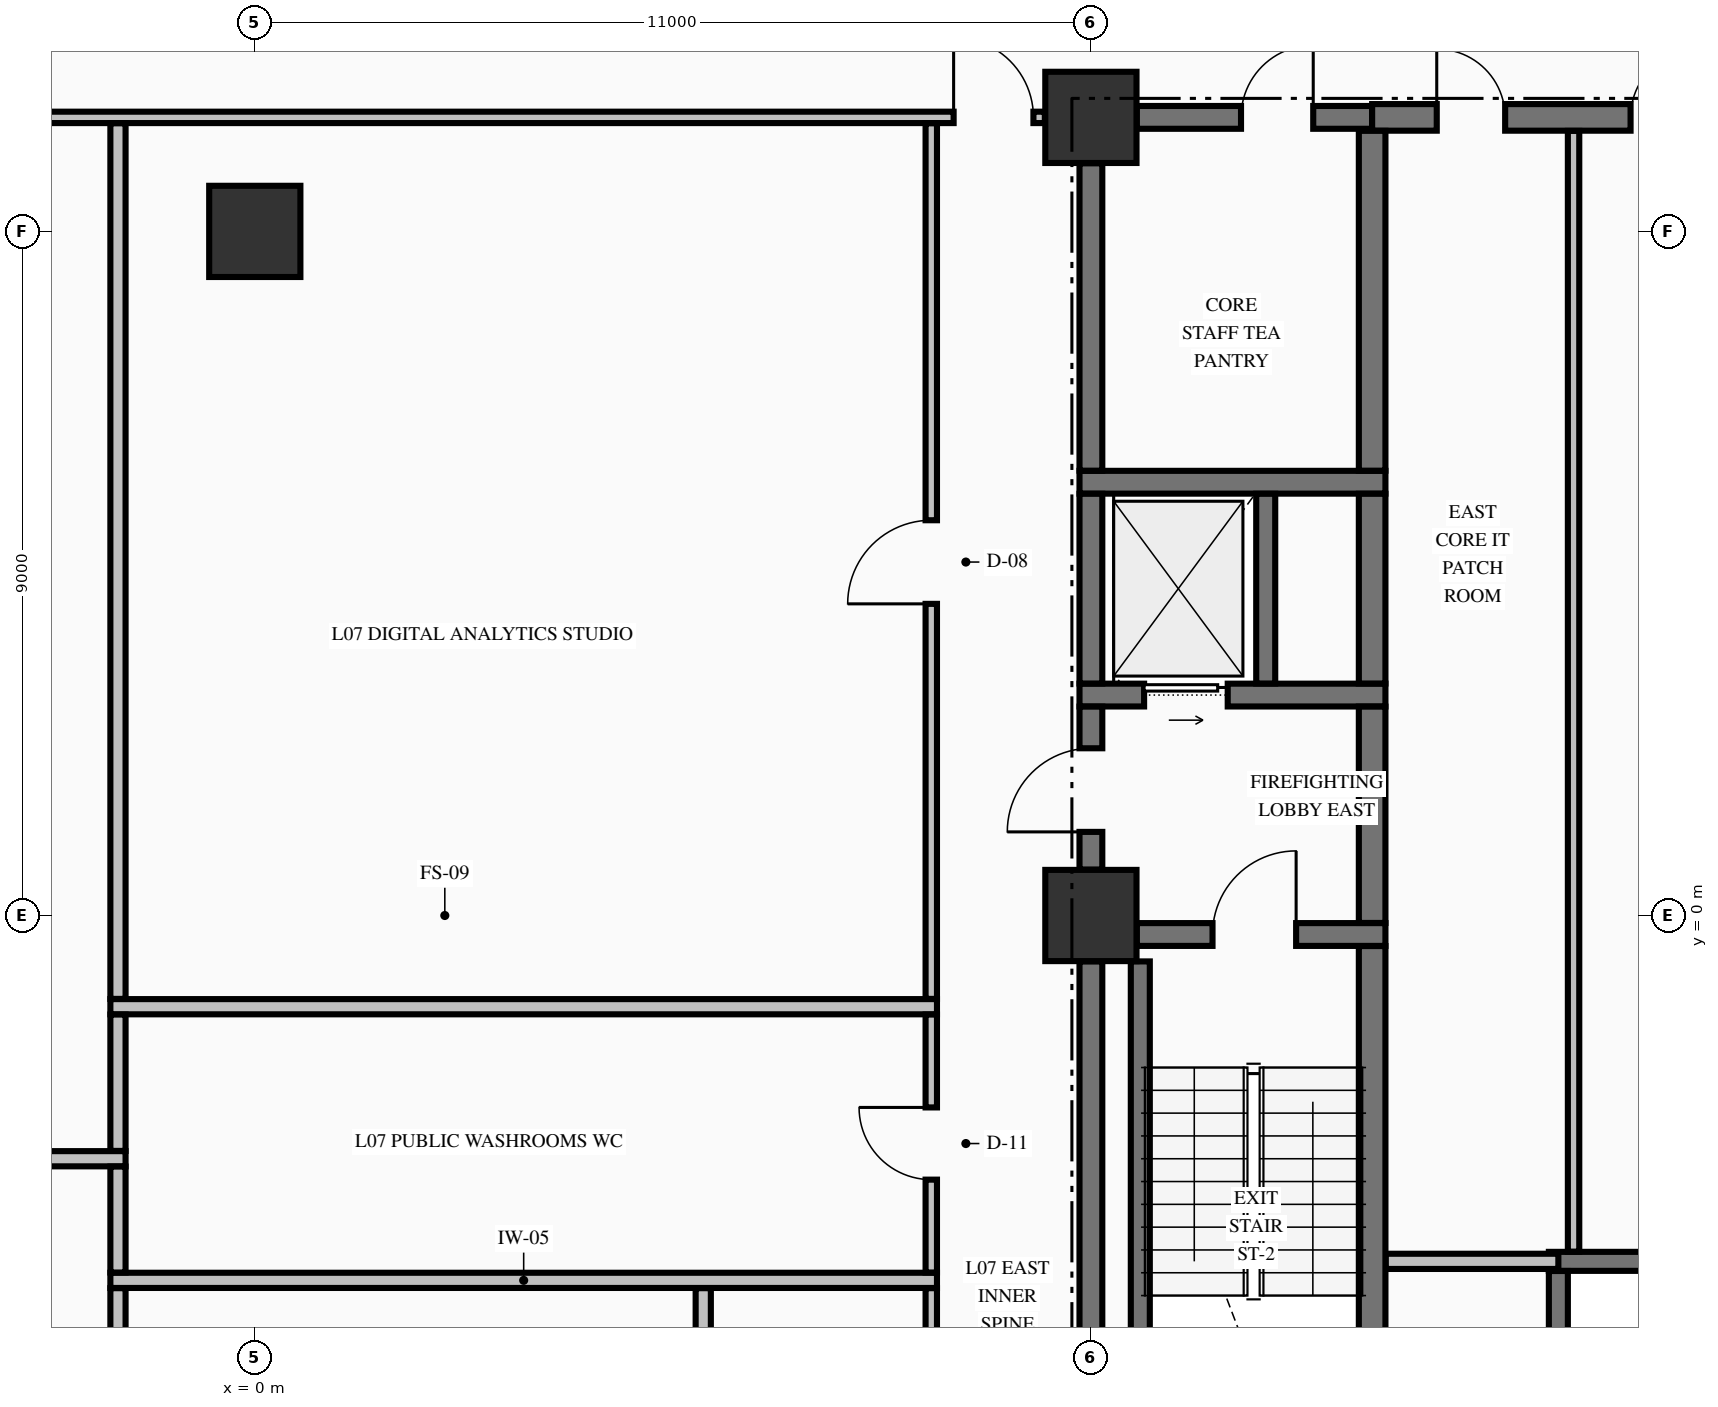
"""IFC4 building model, lengths in metres.
Left out: names, types, materials, properties, quantities, classifications, styles, units other than length and angle.
Written with IfcOpenShell. Run it as: python <this file> out.ifc"""

import sys

from ifc_helpers import new_model, si_unit, direction, frame, frame_2d, origin, origin_2d, place, context, subcontext, project, spatial, rectangle, extrude, element, fill, save


model = new_model("IFC4")
c1 = context("Model", 3, precision=1e-05, world=origin(), true_north=direction((0.0, 1.0)))
c2 = subcontext(c1, "Body", "Model", "MODEL_VIEW")
j1 = project(units=[si_unit("LENGTHUNIT", "METRE"), si_unit("PLANEANGLEUNIT", "RADIAN")], contexts=[c1])
p1 = place(None, origin())
s1 = spatial("IfcSite", under=j1, at=p1, CompositionType="ELEMENT")
p2 = place(p1, origin())
s2 = spatial("IfcBuilding", under=s1, at=p2, CompositionType="ELEMENT")
p3 = place(p2, frame((0.0, 0.0, 34.34)))
s3 = spatial("IfcBuildingStorey", under=s2, at=p3, CompositionType="ELEMENT", Elevation=34.34)
for number, where, z_axis, x_axis in (
    (1, (11.0, 0.0, -0.3), (0.0, 0.0, 1.0), (1.0, 0.0, 0.0)),
    (2, (11.0, 10.5, -0.3), (0.0, 0.0, 1.0), (1.0, 0.0, 0.0)),
    (3, (0.0, 9.0, -0.3), (0.0, 0.0, 1.0), (1.0, 0.0, 0.0)),
):
    element("IfcColumn", number, at=place(p3, frame(where, z_axis=z_axis, x_axis=x_axis)), inside=s3, PredefinedType="COLUMN", context=c2, shape_type="SweptSolid", body=[
        extrude(rectangle(XDim=1.2, YDim=1.2, at=origin_2d()), origin(), (0.0, 0.0, 1.0), 3.62),
    ])
p4 = place(p3, frame((17.025, -4.55, 0.0), z_axis=(0.0, 0.0, 1.0), x_axis=(1.0, 0.0, 0.0)))
e4 = element("IfcWall", 4, at=p4, inside=s3, PredefinedType="SOLIDWALL", context=c2, shape_type="SweptSolid", body=[
    extrude(rectangle(XDim=3.15, YDim=0.25, at=frame_2d((1.575, 0.0))), origin(), (0.0, 0.0, 1.0), 3.32),
])
p5 = place(p3, frame((11.604, -0.25, 0.0), z_axis=(0.0, 0.0, 1.0), x_axis=(1.0, 0.0, 0.0)))
e5 = element("IfcWall", 5, at=p5, inside=s3, PredefinedType="SHEAR", context=c2, shape_type="SweptSolid", body=[
    extrude(rectangle(XDim=3.271, YDim=0.3, at=frame_2d((1.635, 0.0))), origin(), (0.0, 0.0, 1.0), 3.32),
])
p6 = place(p5, frame((0.996, 0.0, 0.0)))
e6 = element("IfcOpeningElement", 6, at=p6, cuts=e5, PredefinedType="OPENING", context=c2, shape_type="SweptSolid", body=[
    extrude(rectangle(XDim=1.1, YDim=2.15, at=frame_2d((0.55, 1.075))), frame((0.0, 0.16, 0.0), z_axis=(0.0, -1.0, 0.0), x_axis=(1.0, 0.0, 0.0)), (0.0, 0.0, 1.0), 0.32),
])
p7 = place(p3, frame((10.85, 2.9, 0.0), z_axis=(0.0, 0.0, 1.0), x_axis=(1.0, 0.0, 0.0)))
e7 = element("IfcWall", 7, at=p7, inside=s3, PredefinedType="SHEAR", context=c2, shape_type="SweptSolid", body=[
    extrude(rectangle(XDim=4.025, YDim=0.3, at=frame_2d((2.012, 0.0))), origin(), (0.0, 0.0, 1.0), 3.32),
])
p8 = place(p7, frame((0.85, 0.0, 0.0)))
e8 = element("IfcOpeningElement", 8, at=p8, cuts=e7, PredefinedType="OPENING", context=c2, shape_type="SweptSolid", body=[
    extrude(rectangle(XDim=1.1, YDim=2.2, at=frame_2d((0.55, 1.1))), frame((0.0, 0.16, 0.0), z_axis=(0.0, -1.0, 0.0), x_axis=(1.0, 0.0, 0.0)), (0.0, 0.0, 1.0), 0.32),
])
p9 = place(p3, frame((10.85, 5.7, 0.0), z_axis=(0.0, 0.0, 1.0), x_axis=(1.0, 0.0, 0.0)))
e9 = element("IfcWall", 9, at=p9, inside=s3, PredefinedType="SHEAR", context=c2, shape_type="SweptSolid", body=[
    extrude(rectangle(XDim=4.025, YDim=0.3, at=frame_2d((2.012, 0.0))), origin(), (0.0, 0.0, 1.0), 3.32),
])
p10 = place(p3, frame((11.604, 10.5, 0.0), z_axis=(0.0, 0.0, 1.0), x_axis=(1.0, 0.0, 0.0)))
e10 = element("IfcWall", 10, at=p10, inside=s3, PredefinedType="SHEAR", context=c2, shape_type="SweptSolid", body=[
    extrude(rectangle(XDim=3.096, YDim=0.3, at=frame_2d((1.548, 0.0))), origin(), (0.0, 0.0, 1.0), 3.32),
])
p11 = place(p10, frame((1.371, 0.0, 0.0)))
e11 = element("IfcOpeningElement", 11, at=p11, cuts=e10, PredefinedType="OPENING", context=c2, shape_type="SweptSolid", body=[
    extrude(rectangle(XDim=0.95, YDim=2.15, at=frame_2d((0.475, 1.075))), frame((0.0, 0.16, 0.0), z_axis=(0.0, -1.0, 0.0), x_axis=(1.0, 0.0, 0.0)), (0.0, 0.0, 1.0), 0.32),
])
p12 = place(p3, frame((14.7, 10.5, 0.0), z_axis=(0.0, 0.0, 1.0), x_axis=(1.0, 0.0, 0.0)))
e12 = element("IfcWall", 12, at=p12, inside=s3, PredefinedType="SHEAR", context=c2, shape_type="SweptSolid", body=[
    extrude(rectangle(XDim=4.696, YDim=0.35, at=frame_2d((2.348, 0.0))), origin(), (0.0, 0.0, 1.0), 3.32),
])
p13 = place(p12, frame((0.85, 0.0, 0.0)))
e13 = element("IfcOpeningElement", 13, at=p13, cuts=e12, PredefinedType="OPENING", context=c2, shape_type="SweptSolid", body=[
    extrude(rectangle(XDim=0.9, YDim=2.15, at=frame_2d((0.45, 1.075))), frame((0.0, 0.185, 0.0), z_axis=(0.0, -1.0, 0.0), x_axis=(1.0, 0.0, 0.0)), (0.0, 0.0, 1.0), 0.37),
])
p14 = place(p12, frame((3.4, 0.0, 0.0)))
e14 = element("IfcOpeningElement", 14, at=p14, cuts=e12, PredefinedType="OPENING", context=c2, shape_type="SweptSolid", body=[
    extrude(rectangle(XDim=0.9, YDim=2.15, at=frame_2d((0.45, 1.075))), frame((0.0, 0.185, 0.0), z_axis=(0.0, -1.0, 0.0), x_axis=(1.0, 0.0, 0.0)), (0.0, 0.0, 1.0), 0.37),
])
p15 = place(p3, frame((-1.9, -4.8, 0.0), z_axis=(0.0, 0.0, 1.0), x_axis=(1.0, 0.0, 0.0)))
e15 = element("IfcWall", 15, at=p15, inside=s3, PredefinedType="PARTITIONING", context=c2, shape_type="SweptSolid", body=[
    extrude(rectangle(XDim=10.875, YDim=0.2, at=frame_2d((5.438, 0.0))), origin(), (0.0, 0.0, 1.0), 3.32),
])
p16 = place(p3, frame((14.878, -4.55, 0.0), z_axis=(0.0, 0.0, 1.0), x_axis=(1.0, 0.0, 0.0)))
e16 = element("IfcWall", 16, at=p16, inside=s3, PredefinedType="PARTITIONING", context=c2, shape_type="SweptSolid", body=[
    extrude(rectangle(XDim=2.272, YDim=0.2, at=frame_2d((1.136, 0.0))), origin(), (0.0, 0.0, 1.0), 3.32),
])
p17 = place(p3, frame((-8.975, -3.2, 0.0), z_axis=(0.0, 0.0, 1.0), x_axis=(1.0, 0.0, 0.0)))
e17 = element("IfcWall", 17, at=p17, inside=s3, PredefinedType="PARTITIONING", context=c2, shape_type="SweptSolid", body=[
    extrude(rectangle(XDim=7.275, YDim=0.2, at=frame_2d((3.638, 0.0))), origin(), (0.0, 0.0, 1.0), 3.32),
])
p18 = place(p3, frame((-1.9, -1.2, 0.0), z_axis=(0.0, 0.0, 1.0), x_axis=(1.0, 0.0, 0.0)))
e18 = element("IfcWall", 18, at=p18, inside=s3, PredefinedType="PARTITIONING", context=c2, shape_type="SweptSolid", body=[
    extrude(rectangle(XDim=10.875, YDim=0.2, at=frame_2d((5.438, 0.0))), origin(), (0.0, 0.0, 1.0), 3.32),
])
p19 = place(p3, frame((-10.394, 10.5, 0.0), z_axis=(0.0, 0.0, 1.0), x_axis=(1.0, 0.0, 0.0)))
e19 = element("IfcWall", 19, at=p19, inside=s3, PredefinedType="PARTITIONING", context=c2, shape_type="SweptSolid", body=[
    extrude(rectangle(XDim=20.788, YDim=0.15, at=frame_2d((10.394, 0.0))), origin(), (0.0, 0.0, 1.0), 3.32),
])
p20 = place(p19, frame((0.15, 0.0, 0.0)))
e20 = element("IfcOpeningElement", 20, at=p20, cuts=e19, PredefinedType="OPENING", context=c2, shape_type="SweptSolid", body=[
    extrude(rectangle(XDim=1.05, YDim=2.15, at=frame_2d((0.525, 1.075))), frame((0.0, 0.085, 0.0), z_axis=(0.0, -1.0, 0.0), x_axis=(1.0, 0.0, 0.0)), (0.0, 0.0, 1.0), 0.17),
])
p21 = place(p19, frame((19.588, 0.0, 0.0)))
e21 = element("IfcOpeningElement", 21, at=p21, cuts=e19, PredefinedType="OPENING", context=c2, shape_type="SweptSolid", body=[
    extrude(rectangle(XDim=1.05, YDim=2.15, at=frame_2d((0.525, 1.075))), frame((0.0, 0.085, 0.0), z_axis=(0.0, -1.0, 0.0), x_axis=(1.0, 0.0, 0.0)), (0.0, 0.0, 1.0), 0.17),
])
p22 = place(p3, frame((11.0, -9.346, 0.0), z_axis=(0.0, 0.0, 1.0), x_axis=(0.0, 1.0, 0.0)))
e22 = element("IfcWall", 22, at=p22, inside=s3, PredefinedType="SHEAR", context=c2, shape_type="SweptSolid", body=[
    extrude(rectangle(XDim=8.742, YDim=0.3, at=frame_2d((4.371, 0.0))), origin(), (0.0, 0.0, 1.0), 3.32),
])
p23 = place(p3, frame((11.0, 0.604, 0.0), z_axis=(0.0, 0.0, 1.0), x_axis=(0.0, 1.0, 0.0)))
e23 = element("IfcWall", 23, at=p23, inside=s3, PredefinedType="SHEAR", context=c2, shape_type="SweptSolid", body=[
    extrude(rectangle(XDim=2.144, YDim=0.3, at=frame_2d((1.072, 0.0))), origin(), (0.0, 0.0, 1.0), 3.32),
])
p24 = place(p23, frame((0.496, 0.0, 0.0)))
e24 = element("IfcOpeningElement", 24, at=p24, cuts=e23, PredefinedType="OPENING", context=c2, shape_type="SweptSolid", body=[
    extrude(rectangle(XDim=1.1, YDim=2.15, at=frame_2d((0.55, 1.075))), frame((0.0, 0.16, 0.0), z_axis=(0.0, -1.0, 0.0), x_axis=(1.0, 0.0, 0.0)), (0.0, 0.0, 1.0), 0.32),
])
p25 = place(p3, frame((11.0, 3.052, 0.0), z_axis=(0.0, 0.0, 1.0), x_axis=(0.0, 1.0, 0.0)))
e25 = element("IfcWall", 25, at=p25, inside=s3, PredefinedType="SHEAR", context=c2, shape_type="SweptSolid", body=[
    extrude(rectangle(XDim=2.496, YDim=0.3, at=frame_2d((1.248, 0.0))), origin(), (0.0, 0.0, 1.0), 3.32),
])
p26 = place(p3, frame((11.0, 5.852, 0.0), z_axis=(0.0, 0.0, 1.0), x_axis=(0.0, 1.0, 0.0)))
e26 = element("IfcWall", 26, at=p26, inside=s3, PredefinedType="SHEAR", context=c2, shape_type="SweptSolid", body=[
    extrude(rectangle(XDim=4.044, YDim=0.3, at=frame_2d((2.022, 0.0))), origin(), (0.0, 0.0, 1.0), 3.32),
])
p27 = place(p3, frame((11.65, -9.346, 0.0), z_axis=(0.0, 0.0, 1.0), x_axis=(0.0, 1.0, 0.0)))
e27 = element("IfcWall", 27, at=p27, inside=s3, PredefinedType="SOLIDWALL", context=c2, shape_type="SweptSolid", body=[
    extrude(rectangle(XDim=8.742, YDim=0.25, at=frame_2d((4.371, 0.0))), origin(), (0.0, 0.0, 1.0), 3.32),
])
p28 = place(p3, frame((13.3, 3.052, 0.0), z_axis=(0.0, 0.0, 1.0), x_axis=(0.0, 1.0, 0.0)))
e28 = element("IfcWall", 28, at=p28, inside=s3, PredefinedType="SOLIDWALL", context=c2, shape_type="SweptSolid", body=[
    extrude(rectangle(XDim=2.496, YDim=0.25, at=frame_2d((1.248, 0.0))), origin(), (0.0, 0.0, 1.0), 3.32),
])
p29 = place(p3, frame((14.7, -9.773, 0.0), z_axis=(0.0, 0.0, 1.0), x_axis=(0.0, 1.0, 0.0)))
e29 = element("IfcWall", 29, at=p29, inside=s3, PredefinedType="SHEAR", context=c2, shape_type="SweptSolid", body=[
    extrude(rectangle(XDim=9.371, YDim=0.35, at=frame_2d((4.686, 0.0))), origin(), (0.0, 0.0, 1.0), 3.32),
])
p30 = place(p3, frame((14.7, -0.098, 0.0), z_axis=(0.0, 0.0, 1.0), x_axis=(0.0, 1.0, 0.0)))
e30 = element("IfcWall", 30, at=p30, inside=s3, PredefinedType="SHEAR", context=c2, shape_type="SweptSolid", body=[
    extrude(rectangle(XDim=2.846, YDim=0.35, at=frame_2d((1.423, 0.0))), origin(), (0.0, 0.0, 1.0), 3.32),
])
p31 = place(p3, frame((14.7, 3.052, 0.0), z_axis=(0.0, 0.0, 1.0), x_axis=(0.0, 1.0, 0.0)))
e31 = element("IfcWall", 31, at=p31, inside=s3, PredefinedType="SHEAR", context=c2, shape_type="SweptSolid", body=[
    extrude(rectangle(XDim=2.496, YDim=0.35, at=frame_2d((1.248, 0.0))), origin(), (0.0, 0.0, 1.0), 3.32),
])
p32 = place(p3, frame((14.7, 5.852, 0.0), z_axis=(0.0, 0.0, 1.0), x_axis=(0.0, 1.0, 0.0)))
e32 = element("IfcWall", 32, at=p32, inside=s3, PredefinedType="SHEAR", context=c2, shape_type="SweptSolid", body=[
    extrude(rectangle(XDim=4.471, YDim=0.35, at=frame_2d((2.235, 0.0))), origin(), (0.0, 0.0, 1.0), 3.32),
])
p33 = place(p3, frame((17.15, -6.923, 0.0), z_axis=(0.0, 0.0, 1.0), x_axis=(0.0, 1.0, 0.0)))
e33 = element("IfcWall", 33, at=p33, inside=s3, PredefinedType="SOLIDWALL", context=c2, shape_type="SweptSolid", body=[
    extrude(rectangle(XDim=2.246, YDim=0.25, at=frame_2d((1.123, 0.0))), origin(), (0.0, 0.0, 1.0), 3.32),
])
p34 = place(p3, frame((-1.8, -9.872, 0.0), z_axis=(0.0, 0.0, 1.0), x_axis=(0.0, 1.0, 0.0)))
e34 = element("IfcWall", 34, at=p34, inside=s3, PredefinedType="PARTITIONING", context=c2, shape_type="SweptSolid", body=[
    extrude(rectangle(XDim=4.969, YDim=0.2, at=frame_2d((2.484, 0.0))), origin(), (0.0, 0.0, 1.0), 3.32),
])
p35 = place(p3, frame((-1.8, -4.697, 0.0), z_axis=(0.0, 0.0, 1.0), x_axis=(0.0, 1.0, 0.0)))
e35 = element("IfcWall", 35, at=p35, inside=s3, PredefinedType="PARTITIONING", context=c2, shape_type="SweptSolid", body=[
    extrude(rectangle(XDim=1.394, YDim=0.2, at=frame_2d((0.697, 0.0))), origin(), (0.0, 0.0, 1.0), 3.32),
])
p36 = place(p3, frame((-1.8, -3.097, 0.0), z_axis=(0.0, 0.0, 1.0), x_axis=(0.0, 1.0, 0.0)))
e36 = element("IfcWall", 36, at=p36, inside=s3, PredefinedType="PARTITIONING", context=c2, shape_type="SweptSolid", body=[
    extrude(rectangle(XDim=1.794, YDim=0.2, at=frame_2d((0.897, 0.0))), origin(), (0.0, 0.0, 1.0), 3.32),
])
p37 = place(p3, frame((-1.8, -1.097, 0.0), z_axis=(0.0, 0.0, 1.0), x_axis=(0.0, 1.0, 0.0)))
e37 = element("IfcWall", 37, at=p37, inside=s3, PredefinedType="PARTITIONING", context=c2, shape_type="SweptSolid", body=[
    extrude(rectangle(XDim=11.519, YDim=0.2, at=frame_2d((5.76, 0.0))), origin(), (0.0, 0.0, 1.0), 3.32),
])
p38 = place(p3, frame((5.9, -9.872, 0.0), z_axis=(0.0, 0.0, 1.0), x_axis=(0.0, 1.0, 0.0)))
e38 = element("IfcWall", 38, at=p38, inside=s3, PredefinedType="PARTITIONING", context=c2, shape_type="SweptSolid", body=[
    extrude(rectangle(XDim=4.969, YDim=0.2, at=frame_2d((2.484, 0.0))), origin(), (0.0, 0.0, 1.0), 3.32),
])
p39 = place(p3, frame((8.9, -9.872, 0.0), z_axis=(0.0, 0.0, 1.0), x_axis=(0.0, 1.0, 0.0)))
e39 = element("IfcWall", 39, at=p39, inside=s3, PredefinedType="PARTITIONING", context=c2, shape_type="SweptSolid", body=[
    extrude(rectangle(XDim=4.969, YDim=0.15, at=frame_2d((2.484, 0.0))), origin(), (0.0, 0.0, 1.0), 3.32),
])
p40 = place(p39, frame((1.997, 0.0, 0.0)))
e40 = element("IfcOpeningElement", 40, at=p40, cuts=e39, PredefinedType="OPENING", context=c2, shape_type="SweptSolid", body=[
    extrude(rectangle(XDim=0.95, YDim=2.15, at=frame_2d((0.475, 1.075))), frame((0.0, 0.085, 0.0), z_axis=(0.0, -1.0, 0.0), x_axis=(1.0, 0.0, 0.0)), (0.0, 0.0, 1.0), 0.17),
])
p41 = place(p3, frame((8.9, -4.697, 0.0), z_axis=(0.0, 0.0, 1.0), x_axis=(0.0, 1.0, 0.0)))
e41 = element("IfcWall", 41, at=p41, inside=s3, PredefinedType="PARTITIONING", context=c2, shape_type="SweptSolid", body=[
    extrude(rectangle(XDim=3.394, YDim=0.15, at=frame_2d((1.697, 0.0))), origin(), (0.0, 0.0, 1.0), 3.32),
])
p42 = place(p41, frame((1.222, 0.0, 0.0)))
e42 = element("IfcOpeningElement", 42, at=p42, cuts=e41, PredefinedType="OPENING", context=c2, shape_type="SweptSolid", body=[
    extrude(rectangle(XDim=0.95, YDim=2.15, at=frame_2d((0.475, 1.075))), frame((0.0, 0.085, 0.0), z_axis=(0.0, -1.0, 0.0), x_axis=(1.0, 0.0, 0.0)), (0.0, 0.0, 1.0), 0.17),
])
p43 = place(p3, frame((8.9, -1.097, 0.0), z_axis=(0.0, 0.0, 1.0), x_axis=(0.0, 1.0, 0.0)))
e43 = element("IfcWall", 43, at=p43, inside=s3, PredefinedType="PARTITIONING", context=c2, shape_type="SweptSolid", body=[
    extrude(rectangle(XDim=11.519, YDim=0.15, at=frame_2d((5.76, 0.0))), origin(), (0.0, 0.0, 1.0), 3.32),
])
p44 = place(p43, frame((5.197, 0.0, 0.0)))
e44 = element("IfcOpeningElement", 44, at=p44, cuts=e43, PredefinedType="OPENING", context=c2, shape_type="SweptSolid", body=[
    extrude(rectangle(XDim=1.1, YDim=2.15, at=frame_2d((0.55, 1.075))), frame((0.0, 0.085, 0.0), z_axis=(0.0, -1.0, 0.0), x_axis=(1.0, 0.0, 0.0)), (0.0, 0.0, 1.0), 0.17),
])
p45 = place(p3, frame((17.35, -4.422, 0.0), z_axis=(0.0, 0.0, 1.0), x_axis=(0.0, 1.0, 0.0)))
e45 = element("IfcWall", 45, at=p45, inside=s3, PredefinedType="PARTITIONING", context=c2, shape_type="SweptSolid", body=[
    extrude(rectangle(XDim=14.744, YDim=0.15, at=frame_2d((7.372, 0.0))), origin(), (0.0, 0.0, 1.0), 3.32),
])
p46 = place(p6, origin())
e46 = element("IfcDoor", 46, at=p46, inside=s3, OperationType="SINGLE_SWING_RIGHT", PredefinedType="DOOR", context=c2, shape_type="SweptSolid", body=[
    extrude(rectangle(XDim=1.1, YDim=2.15, at=frame_2d((0.55, 1.075))), frame((0.0, 0.025, 0.0), z_axis=(0.0, -1.0, 0.0), x_axis=(1.0, 0.0, 0.0)), (0.0, 0.0, 1.0), 0.05),
])
fill(e6, e46)
p47 = place(p24, origin())
e47 = element("IfcDoor", 47, at=p47, inside=s3, OperationType="SINGLE_SWING_LEFT", PredefinedType="DOOR", context=c2, shape_type="SweptSolid", body=[
    extrude(rectangle(XDim=1.1, YDim=2.15, at=frame_2d((0.55, 1.075))), frame((0.0, 0.025, 0.0), z_axis=(0.0, -1.0, 0.0), x_axis=(1.0, 0.0, 0.0)), (0.0, 0.0, 1.0), 0.05),
])
fill(e24, e47)
p48 = place(p8, origin())
e48 = element("IfcDoor", 48, at=p48, inside=s3, OperationType="SLIDING_TO_RIGHT", PredefinedType="DOOR", context=c2, shape_type="SweptSolid", body=[
    extrude(rectangle(XDim=1.1, YDim=2.2, at=frame_2d((0.55, 1.1))), frame((0.0, 0.025, 0.0), z_axis=(0.0, -1.0, 0.0), x_axis=(1.0, 0.0, 0.0)), (0.0, 0.0, 1.0), 0.05),
])
fill(e8, e48)
p49 = place(p11, origin())
e49 = element("IfcDoor", 49, at=p49, inside=s3, OperationType="SINGLE_SWING_RIGHT", PredefinedType="DOOR", context=c2, shape_type="SweptSolid", body=[
    extrude(rectangle(XDim=0.95, YDim=2.15, at=frame_2d((0.475, 1.075))), frame((0.0, 0.025, 0.0), z_axis=(0.0, -1.0, 0.0), x_axis=(1.0, 0.0, 0.0)), (0.0, 0.0, 1.0), 0.05),
])
fill(e11, e49)
p50 = place(p13, origin())
e50 = element("IfcDoor", 50, at=p50, inside=s3, OperationType="SINGLE_SWING_LEFT", PredefinedType="DOOR", context=c2, shape_type="SweptSolid", body=[
    extrude(rectangle(XDim=0.9, YDim=2.15, at=frame_2d((0.45, 1.075))), frame((0.0, 0.025, 0.0), z_axis=(0.0, -1.0, 0.0), x_axis=(1.0, 0.0, 0.0)), (0.0, 0.0, 1.0), 0.05),
])
fill(e13, e50)
p51 = place(p14, origin())
e51 = element("IfcDoor", 51, at=p51, inside=s3, OperationType="SINGLE_SWING_RIGHT", PredefinedType="DOOR", context=c2, shape_type="SweptSolid", body=[
    extrude(rectangle(XDim=0.9, YDim=2.15, at=frame_2d((0.45, 1.075))), frame((0.0, 0.025, 0.0), z_axis=(0.0, -1.0, 0.0), x_axis=(1.0, 0.0, 0.0)), (0.0, 0.0, 1.0), 0.05),
])
fill(e14, e51)
p52 = place(p21, origin())
e52 = element("IfcDoor", 52, at=p52, inside=s3, OperationType="SINGLE_SWING_LEFT", PredefinedType="DOOR", context=c2, shape_type="SweptSolid", body=[
    extrude(rectangle(XDim=1.05, YDim=2.15, at=frame_2d((0.525, 1.075))), frame((0.0, 0.025, 0.0), z_axis=(0.0, -1.0, 0.0), x_axis=(1.0, 0.0, 0.0)), (0.0, 0.0, 1.0), 0.05),
])
fill(e21, e52)
p53 = place(p44, origin())
e53 = element("IfcDoor", 53, at=p53, inside=s3, OperationType="SINGLE_SWING_LEFT", PredefinedType="DOOR", context=c2, shape_type="SweptSolid", body=[
    extrude(rectangle(XDim=1.1, YDim=2.15, at=frame_2d((0.55, 1.075))), frame((0.0, 0.025, 0.0), z_axis=(0.0, -1.0, 0.0), x_axis=(1.0, 0.0, 0.0)), (0.0, 0.0, 1.0), 0.05),
])
fill(e44, e53)
p54 = place(p42, origin())
e54 = element("IfcDoor", 54, at=p54, inside=s3, OperationType="SINGLE_SWING_RIGHT", PredefinedType="DOOR", context=c2, shape_type="SweptSolid", body=[
    extrude(rectangle(XDim=0.95, YDim=2.15, at=frame_2d((0.475, 1.075))), frame((0.0, 0.025, 0.0), z_axis=(0.0, -1.0, 0.0), x_axis=(1.0, 0.0, 0.0)), (0.0, 0.0, 1.0), 0.05),
])
fill(e42, e54)
save(model, sys.argv[1])
